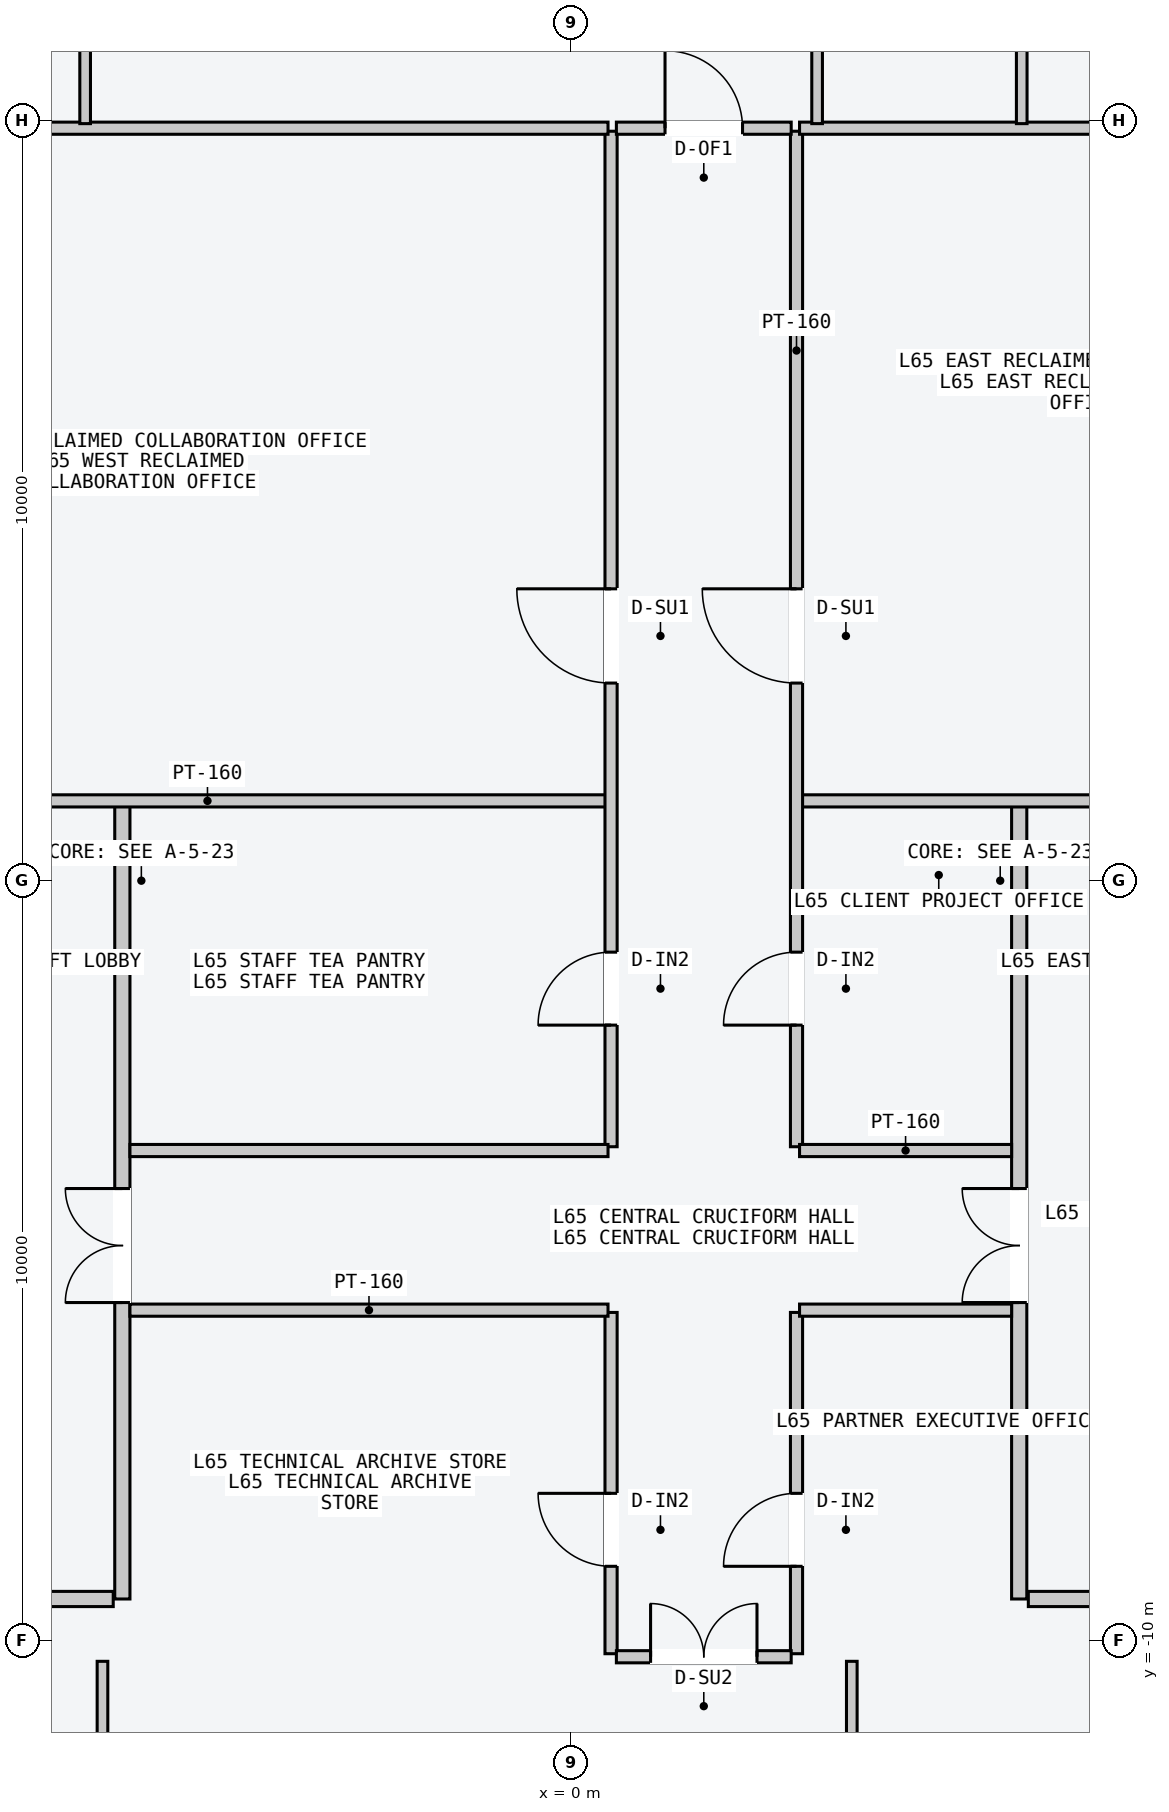
"""IFC4 building model, lengths in metres.
Left out: names, types, materials, properties, quantities, classifications, styles, units other than length and angle.
Written with IfcOpenShell. Run it as: python <this file> out.ifc"""

import sys

from ifc_helpers import new_model, si_unit, direction, frame, frame_2d, origin, place, context, subcontext, project, spatial, rectangle, extrude, element, fill, save


model = new_model("IFC4")
c1 = context("Model", 3, precision=1e-05, world=origin(), true_north=direction((0.0, 1.0)))
c2 = subcontext(c1, "Body", "Model", "MODEL_VIEW")
j1 = project(units=[si_unit("LENGTHUNIT", "METRE"), si_unit("PLANEANGLEUNIT", "RADIAN")], contexts=[c1])
p1 = place(None, origin())
s1 = spatial("IfcSite", under=j1, at=p1, CompositionType="ELEMENT")
p2 = place(p1, origin())
s2 = spatial("IfcBuilding", under=s1, at=p2, CompositionType="ELEMENT")
p3 = place(p2, frame((0.0, 0.0, 247.2)))
s3 = spatial("IfcBuildingStorey", under=s2, at=p3, CompositionType="ELEMENT", Elevation=247.2)
p4 = place(p3, frame((-5.9, -9.45, 0.0), z_axis=(0.0, 0.0, 1.0), x_axis=(0.0, 1.0, 0.0)))
e1 = element("IfcWall", 1, at=p4, inside=s3, PredefinedType="PARTITIONING", context=c2, shape_type="SweptSolid", body=[
    extrude(rectangle(XDim=10.5, YDim=0.2, at=frame_2d((5.25, 0.0))), origin(), (0.0, 0.0, 1.0), 3.4),
])
p5 = place(p4, frame((3.9, 0.0, 0.0)))
e2 = element("IfcOpeningElement", 2, at=p5, cuts=e1, PredefinedType="OPENING", context=c2, shape_type="SweptSolid", body=[
    extrude(rectangle(XDim=1.5, YDim=2.2, at=frame_2d((0.75, 1.1))), frame((0.0, 0.11, 0.0), z_axis=(0.0, -1.0, 0.0), x_axis=(1.0, 0.0, 0.0)), (0.0, 0.0, 1.0), 0.22),
])
p6 = place(p3, frame((-6.02, -9.45, 0.0), z_axis=(0.0, 0.0, 1.0), x_axis=(-1.0, 0.0, 0.0)))
e3 = element("IfcWall", 3, at=p6, inside=s3, PredefinedType="PARTITIONING", context=c2, shape_type="SweptSolid", body=[
    extrude(rectangle(XDim=1.8, YDim=0.2, at=frame_2d((0.9, 0.0))), origin(), (0.0, 0.0, 1.0), 3.4),
])
p7 = place(p3, frame((5.9, -9.45, 0.0), z_axis=(0.0, 0.0, 1.0), x_axis=(0.0, 1.0, 0.0)))
e4 = element("IfcWall", 4, at=p7, inside=s3, PredefinedType="PARTITIONING", context=c2, shape_type="SweptSolid", body=[
    extrude(rectangle(XDim=10.5, YDim=0.2, at=frame_2d((5.25, 0.0))), origin(), (0.0, 0.0, 1.0), 3.4),
])
p8 = place(p7, frame((3.9, 0.0, 0.0)))
e5 = element("IfcOpeningElement", 5, at=p8, cuts=e4, PredefinedType="OPENING", context=c2, shape_type="SweptSolid", body=[
    extrude(rectangle(XDim=1.5, YDim=2.2, at=frame_2d((0.75, 1.1))), frame((0.0, 0.11, 0.0), z_axis=(0.0, -1.0, 0.0), x_axis=(1.0, 0.0, 0.0)), (0.0, 0.0, 1.0), 0.22),
])
p9 = place(p3, frame((6.02, -9.45, 0.0), z_axis=(0.0, 0.0, 1.0), x_axis=(1.0, 0.0, 0.0)))
e6 = element("IfcWall", 6, at=p9, inside=s3, PredefinedType="PARTITIONING", context=c2, shape_type="SweptSolid", body=[
    extrude(rectangle(XDim=1.8, YDim=0.2, at=frame_2d((0.9, 0.0))), origin(), (0.0, 0.0, 1.0), 3.4),
])
p10 = place(p3, frame((-10.05, 1.05, 0.0), z_axis=(0.0, 0.0, 1.0), x_axis=(1.0, 0.0, 0.0)))
e7 = element("IfcWall", 7, at=p10, inside=s3, PredefinedType="PARTITIONING", context=c2, shape_type="SweptSolid", body=[
    extrude(rectangle(XDim=10.54, YDim=0.16, at=frame_2d((5.27, 0.0))), origin(), (0.0, 0.0, 1.0), 3.4),
])
p11 = place(p3, frame((0.53, -3.5, 0.0), z_axis=(0.0, 0.0, 1.0), x_axis=(0.0, 1.0, 0.0)))
e8 = element("IfcWall", 8, at=p11, inside=s3, PredefinedType="PARTITIONING", context=c2, shape_type="SweptSolid", body=[
    extrude(rectangle(XDim=13.36, YDim=0.16, at=frame_2d((6.68, 0.0))), origin(), (0.0, 0.0, 1.0), 3.4),
])
p12 = place(p11, frame((6.1, 0.0, 0.0)))
e9 = element("IfcOpeningElement", 9, at=p12, cuts=e8, PredefinedType="OPENING", context=c2, shape_type="SweptSolid", body=[
    extrude(rectangle(XDim=1.24, YDim=2.24, at=frame_2d((0.62, 1.12))), frame((0.0, 0.09, 0.0), z_axis=(0.0, -1.0, 0.0), x_axis=(1.0, 0.0, 0.0)), (0.0, 0.0, 1.0), 0.18),
])
p13 = place(p11, frame((1.6, 0.0, 0.0)))
e10 = element("IfcOpeningElement", 10, at=p13, cuts=e8, PredefinedType="OPENING", context=c2, shape_type="SweptSolid", body=[
    extrude(rectangle(XDim=0.96, YDim=2.18, at=frame_2d((0.48, 1.09))), frame((0.0, 0.09, 0.0), z_axis=(0.0, -1.0, 0.0), x_axis=(1.0, 0.0, 0.0)), (0.0, 0.0, 1.0), 0.18),
])
p14 = place(p3, frame((-7.5, 9.9, 0.0), z_axis=(0.0, 0.0, 1.0), x_axis=(1.0, 0.0, 0.0)))
e11 = element("IfcWall", 11, at=p14, inside=s3, PredefinedType="PARTITIONING", context=c2, shape_type="SweptSolid", body=[
    extrude(rectangle(XDim=7.99, YDim=0.16, at=frame_2d((3.995, 0.0))), origin(), (0.0, 0.0, 1.0), 3.4),
])
p15 = place(p3, frame((-5.8, -3.55, 0.0), z_axis=(0.0, 0.0, 1.0), x_axis=(1.0, 0.0, 0.0)))
e12 = element("IfcWall", 12, at=p15, inside=s3, PredefinedType="PARTITIONING", context=c2, shape_type="SweptSolid", body=[
    extrude(rectangle(XDim=6.29, YDim=0.16, at=frame_2d((3.145, 0.0))), origin(), (0.0, 0.0, 1.0), 3.4),
])
p16 = place(p3, frame((3.01, 1.05, 0.0), z_axis=(0.0, 0.0, 1.0), x_axis=(1.0, 0.0, 0.0)))
e13 = element("IfcWall", 13, at=p16, inside=s3, PredefinedType="PARTITIONING", context=c2, shape_type="SweptSolid", body=[
    extrude(rectangle(XDim=7.05, YDim=0.16, at=frame_2d((3.525, 0.0))), origin(), (0.0, 0.0, 1.0), 3.4),
])
p17 = place(p3, frame((2.97, -3.5, 0.0), z_axis=(0.0, 0.0, 1.0), x_axis=(0.0, 1.0, 0.0)))
e14 = element("IfcWall", 14, at=p17, inside=s3, PredefinedType="PARTITIONING", context=c2, shape_type="SweptSolid", body=[
    extrude(rectangle(XDim=13.36, YDim=0.16, at=frame_2d((6.68, 0.0))), origin(), (0.0, 0.0, 1.0), 3.4),
])
p18 = place(p17, frame((6.1, 0.0, 0.0)))
e15 = element("IfcOpeningElement", 15, at=p18, cuts=e14, PredefinedType="OPENING", context=c2, shape_type="SweptSolid", body=[
    extrude(rectangle(XDim=1.24, YDim=2.24, at=frame_2d((0.62, 1.12))), frame((0.0, 0.09, 0.0), z_axis=(0.0, -1.0, 0.0), x_axis=(1.0, 0.0, 0.0)), (0.0, 0.0, 1.0), 0.18),
])
p19 = place(p17, frame((1.6, 0.0, 0.0)))
e16 = element("IfcOpeningElement", 16, at=p19, cuts=e14, PredefinedType="OPENING", context=c2, shape_type="SweptSolid", body=[
    extrude(rectangle(XDim=0.96, YDim=2.18, at=frame_2d((0.48, 1.09))), frame((0.0, 0.09, 0.0), z_axis=(0.0, -1.0, 0.0), x_axis=(1.0, 0.0, 0.0)), (0.0, 0.0, 1.0), 0.18),
])
p20 = place(p3, frame((3.01, 9.9, 0.0), z_axis=(0.0, 0.0, 1.0), x_axis=(1.0, 0.0, 0.0)))
e17 = element("IfcWall", 17, at=p20, inside=s3, PredefinedType="PARTITIONING", context=c2, shape_type="SweptSolid", body=[
    extrude(rectangle(XDim=4.49, YDim=0.16, at=frame_2d((2.245, 0.0))), origin(), (0.0, 0.0, 1.0), 3.4),
])
p21 = place(p3, frame((3.01, -3.55, 0.0), z_axis=(0.0, 0.0, 1.0), x_axis=(1.0, 0.0, 0.0)))
e18 = element("IfcWall", 18, at=p21, inside=s3, PredefinedType="PARTITIONING", context=c2, shape_type="SweptSolid", body=[
    extrude(rectangle(XDim=2.79, YDim=0.16, at=frame_2d((1.395, 0.0))), origin(), (0.0, 0.0, 1.0), 3.4),
])
p22 = place(p3, frame((0.53, -10.17, 0.0), z_axis=(0.0, 0.0, 1.0), x_axis=(0.0, 1.0, 0.0)))
e19 = element("IfcWall", 19, at=p22, inside=s3, PredefinedType="PARTITIONING", context=c2, shape_type="SweptSolid", body=[
    extrude(rectangle(XDim=4.49, YDim=0.16, at=frame_2d((2.245, 0.0))), origin(), (0.0, 0.0, 1.0), 3.4),
])
p23 = place(p22, frame((1.15, 0.0, 0.0)))
e20 = element("IfcOpeningElement", 20, at=p23, cuts=e19, PredefinedType="OPENING", context=c2, shape_type="SweptSolid", body=[
    extrude(rectangle(XDim=0.96, YDim=2.18, at=frame_2d((0.48, 1.09))), frame((0.0, 0.09, 0.0), z_axis=(0.0, -1.0, 0.0), x_axis=(1.0, 0.0, 0.0)), (0.0, 0.0, 1.0), 0.18),
])
p24 = place(p3, frame((2.97, -10.17, 0.0), z_axis=(0.0, 0.0, 1.0), x_axis=(0.0, 1.0, 0.0)))
e21 = element("IfcWall", 21, at=p24, inside=s3, PredefinedType="PARTITIONING", context=c2, shape_type="SweptSolid", body=[
    extrude(rectangle(XDim=4.49, YDim=0.16, at=frame_2d((2.245, 0.0))), origin(), (0.0, 0.0, 1.0), 3.4),
])
p25 = place(p24, frame((1.15, 0.0, 0.0)))
e22 = element("IfcOpeningElement", 22, at=p25, cuts=e21, PredefinedType="OPENING", context=c2, shape_type="SweptSolid", body=[
    extrude(rectangle(XDim=0.96, YDim=2.18, at=frame_2d((0.48, 1.09))), frame((0.0, 0.09, 0.0), z_axis=(0.0, -1.0, 0.0), x_axis=(1.0, 0.0, 0.0)), (0.0, 0.0, 1.0), 0.18),
])
p26 = place(p3, frame((-5.8, -5.65, 0.0), z_axis=(0.0, 0.0, 1.0), x_axis=(1.0, 0.0, 0.0)))
e23 = element("IfcWall", 23, at=p26, inside=s3, PredefinedType="PARTITIONING", context=c2, shape_type="SweptSolid", body=[
    extrude(rectangle(XDim=6.29, YDim=0.16, at=frame_2d((3.145, 0.0))), origin(), (0.0, 0.0, 1.0), 3.4),
])
p27 = place(p3, frame((3.01, -5.65, 0.0), z_axis=(0.0, 0.0, 1.0), x_axis=(1.0, 0.0, 0.0)))
e24 = element("IfcWall", 24, at=p27, inside=s3, PredefinedType="PARTITIONING", context=c2, shape_type="SweptSolid", body=[
    extrude(rectangle(XDim=2.79, YDim=0.16, at=frame_2d((1.395, 0.0))), origin(), (0.0, 0.0, 1.0), 3.4),
])
p28 = place(p3, frame((-6.39, 9.96, 0.0), z_axis=(0.0, 0.0, 1.0), x_axis=(0.0, 1.0, 0.0)))
e25 = element("IfcWall", 25, at=p28, inside=s3, PredefinedType="PARTITIONING", context=c2, shape_type="SweptSolid", body=[
    extrude(rectangle(XDim=7.6, YDim=0.14, at=frame_2d((3.8, 0.0))), origin(), (0.0, 0.0, 1.0), 3.4),
])
p29 = place(p28, frame((1.15, 0.0, 0.0)))
e26 = element("IfcOpeningElement", 26, at=p29, cuts=e25, PredefinedType="OPENING", context=c2, shape_type="SweptSolid", body=[
    extrude(rectangle(XDim=0.96, YDim=2.18, at=frame_2d((0.48, 1.09))), frame((0.0, 0.08, 0.0), z_axis=(0.0, -1.0, 0.0), x_axis=(1.0, 0.0, 0.0)), (0.0, 0.0, 1.0), 0.16),
])
p30 = place(p3, frame((3.241, 9.96, 0.0), z_axis=(0.0, 0.0, 1.0), x_axis=(0.0, 1.0, 0.0)))
e27 = element("IfcWall", 27, at=p30, inside=s3, PredefinedType="PARTITIONING", context=c2, shape_type="SweptSolid", body=[
    extrude(rectangle(XDim=7.6, YDim=0.14, at=frame_2d((3.8, 0.0))), origin(), (0.0, 0.0, 1.0), 3.4),
])
p31 = place(p30, frame((1.15, 0.0, 0.0)))
e28 = element("IfcOpeningElement", 28, at=p31, cuts=e27, PredefinedType="OPENING", context=c2, shape_type="SweptSolid", body=[
    extrude(rectangle(XDim=0.96, YDim=2.18, at=frame_2d((0.48, 1.09))), frame((0.0, 0.08, 0.0), z_axis=(0.0, -1.0, 0.0), x_axis=(1.0, 0.0, 0.0)), (0.0, 0.0, 1.0), 0.16),
])
p32 = place(p3, frame((5.933, 9.96, 0.0), z_axis=(0.0, 0.0, 1.0), x_axis=(0.0, 1.0, 0.0)))
e29 = element("IfcWall", 29, at=p32, inside=s3, PredefinedType="PARTITIONING", context=c2, shape_type="SweptSolid", body=[
    extrude(rectangle(XDim=7.6, YDim=0.14, at=frame_2d((3.8, 0.0))), origin(), (0.0, 0.0, 1.0), 3.4),
])
p33 = place(p32, frame((1.15, 0.0, 0.0)))
e30 = element("IfcOpeningElement", 30, at=p33, cuts=e29, PredefinedType="OPENING", context=c2, shape_type="SweptSolid", body=[
    extrude(rectangle(XDim=0.96, YDim=2.18, at=frame_2d((0.48, 1.09))), frame((0.0, 0.08, 0.0), z_axis=(0.0, -1.0, 0.0), x_axis=(1.0, 0.0, 0.0)), (0.0, 0.0, 1.0), 0.16),
])
p34 = place(p3, frame((0.6, 9.9, 0.0), z_axis=(0.0, 0.0, 1.0), x_axis=(1.0, 0.0, 0.0)))
e31 = element("IfcWall", 31, at=p34, inside=s3, PredefinedType="PARTITIONING", context=c2, shape_type="SweptSolid", body=[
    extrude(rectangle(XDim=2.3, YDim=0.16, at=frame_2d((1.15, 0.0))), origin(), (0.0, 0.0, 1.0), 3.4),
])
p35 = place(p34, frame((0.64, 0.0, 0.0)))
e32 = element("IfcOpeningElement", 32, at=p35, cuts=e31, PredefinedType="OPENING", context=c2, shape_type="SweptSolid", body=[
    extrude(rectangle(XDim=1.02, YDim=2.2, at=frame_2d((0.51, 1.1))), frame((0.0, 0.09, 0.0), z_axis=(0.0, -1.0, 0.0), x_axis=(1.0, 0.0, 0.0)), (0.0, 0.0, 1.0), 0.18),
])
p36 = place(p3, frame((-6.161, -16.55, 0.0), z_axis=(0.0, 0.0, 1.0), x_axis=(0.0, 1.0, 0.0)))
e33 = element("IfcWall", 33, at=p36, inside=s3, PredefinedType="PARTITIONING", context=c2, shape_type="SweptSolid", body=[
    extrude(rectangle(XDim=6.28, YDim=0.14, at=frame_2d((3.14, 0.0))), origin(), (0.0, 0.0, 1.0), 3.4),
])
p37 = place(p36, frame((1.05, 0.0, 0.0)))
e34 = element("IfcOpeningElement", 34, at=p37, cuts=e33, PredefinedType="OPENING", context=c2, shape_type="SweptSolid", body=[
    extrude(rectangle(XDim=0.96, YDim=2.18, at=frame_2d((0.48, 1.09))), frame((0.0, 0.08, 0.0), z_axis=(0.0, -1.0, 0.0), x_axis=(1.0, 0.0, 0.0)), (0.0, 0.0, 1.0), 0.16),
])
p38 = place(p3, frame((3.698, -17.56, 0.0), z_axis=(0.0, 0.0, 1.0), x_axis=(0.0, 1.0, 0.0)))
e35 = element("IfcWall", 35, at=p38, inside=s3, PredefinedType="PARTITIONING", context=c2, shape_type="SweptSolid", body=[
    extrude(rectangle(XDim=7.29, YDim=0.14, at=frame_2d((3.645, 0.0))), origin(), (0.0, 0.0, 1.0), 3.4),
])
p39 = place(p38, frame((1.05, 0.0, 0.0)))
e36 = element("IfcOpeningElement", 36, at=p39, cuts=e35, PredefinedType="OPENING", context=c2, shape_type="SweptSolid", body=[
    extrude(rectangle(XDim=0.96, YDim=2.18, at=frame_2d((0.48, 1.09))), frame((0.0, 0.08, 0.0), z_axis=(0.0, -1.0, 0.0), x_axis=(1.0, 0.0, 0.0)), (0.0, 0.0, 1.0), 0.16),
])
p40 = place(p3, frame((0.6, -10.21, 0.0), z_axis=(0.0, 0.0, 1.0), x_axis=(1.0, 0.0, 0.0)))
e37 = element("IfcWall", 37, at=p40, inside=s3, PredefinedType="PARTITIONING", context=c2, shape_type="SweptSolid", body=[
    extrude(rectangle(XDim=2.3, YDim=0.16, at=frame_2d((1.15, 0.0))), origin(), (0.0, 0.0, 1.0), 3.4),
])
p41 = place(p40, frame((0.45, 0.0, 0.0)))
e38 = element("IfcOpeningElement", 38, at=p41, cuts=e37, PredefinedType="OPENING", context=c2, shape_type="SweptSolid", body=[
    extrude(rectangle(XDim=1.4, YDim=2.2, at=frame_2d((0.7, 1.1))), frame((0.0, 0.09, 0.0), z_axis=(0.0, -1.0, 0.0), x_axis=(1.0, 0.0, 0.0)), (0.0, 0.0, 1.0), 0.18),
])
p42 = place(p5, origin())
e39 = element("IfcDoor", 39, at=p42, inside=s3, OperationType="DOUBLE_DOOR_SINGLE_SWING", PredefinedType="DOOR", context=c2, shape_type="SweptSolid", body=[
    extrude(rectangle(XDim=1.5, YDim=2.2, at=frame_2d((0.75, 1.1))), frame((0.0, 0.025, 0.0), z_axis=(0.0, -1.0, 0.0), x_axis=(1.0, 0.0, 0.0)), (0.0, 0.0, 1.0), 0.05),
])
fill(e2, e39)
p43 = place(p8, origin())
e40 = element("IfcDoor", 40, at=p43, inside=s3, OperationType="DOUBLE_DOOR_SINGLE_SWING", PredefinedType="DOOR", context=c2, shape_type="SweptSolid", body=[
    extrude(rectangle(XDim=1.5, YDim=2.2, at=frame_2d((0.75, 1.1))), frame((0.0, 0.025, 0.0), z_axis=(0.0, -1.0, 0.0), x_axis=(1.0, 0.0, 0.0)), (0.0, 0.0, 1.0), 0.05),
])
fill(e5, e40)
p44 = place(p12, origin())
e41 = element("IfcDoor", 41, at=p44, inside=s3, OperationType="SINGLE_SWING_RIGHT", PredefinedType="DOOR", context=c2, shape_type="SweptSolid", body=[
    extrude(rectangle(XDim=1.24, YDim=2.24, at=frame_2d((0.62, 1.12))), frame((0.0, 0.025, 0.0), z_axis=(0.0, -1.0, 0.0), x_axis=(1.0, 0.0, 0.0)), (0.0, 0.0, 1.0), 0.05),
])
fill(e9, e41)
p45 = place(p13, origin())
e42 = element("IfcDoor", 42, at=p45, inside=s3, OperationType="SINGLE_SWING_LEFT", PredefinedType="DOOR", context=c2, shape_type="SweptSolid", body=[
    extrude(rectangle(XDim=0.96, YDim=2.18, at=frame_2d((0.48, 1.09))), frame((0.0, 0.025, 0.0), z_axis=(0.0, -1.0, 0.0), x_axis=(1.0, 0.0, 0.0)), (0.0, 0.0, 1.0), 0.05),
])
fill(e10, e42)
p46 = place(p18, origin())
e43 = element("IfcDoor", 43, at=p46, inside=s3, OperationType="SINGLE_SWING_RIGHT", PredefinedType="DOOR", context=c2, shape_type="SweptSolid", body=[
    extrude(rectangle(XDim=1.24, YDim=2.24, at=frame_2d((0.62, 1.12))), frame((0.0, 0.025, 0.0), z_axis=(0.0, -1.0, 0.0), x_axis=(1.0, 0.0, 0.0)), (0.0, 0.0, 1.0), 0.05),
])
fill(e15, e43)
p47 = place(p19, origin())
e44 = element("IfcDoor", 44, at=p47, inside=s3, OperationType="SINGLE_SWING_LEFT", PredefinedType="DOOR", context=c2, shape_type="SweptSolid", body=[
    extrude(rectangle(XDim=0.96, YDim=2.18, at=frame_2d((0.48, 1.09))), frame((0.0, 0.025, 0.0), z_axis=(0.0, -1.0, 0.0), x_axis=(1.0, 0.0, 0.0)), (0.0, 0.0, 1.0), 0.05),
])
fill(e16, e44)
p48 = place(p23, origin())
e45 = element("IfcDoor", 45, at=p48, inside=s3, OperationType="SINGLE_SWING_RIGHT", PredefinedType="DOOR", context=c2, shape_type="SweptSolid", body=[
    extrude(rectangle(XDim=0.96, YDim=2.18, at=frame_2d((0.48, 1.09))), frame((0.0, 0.025, 0.0), z_axis=(0.0, -1.0, 0.0), x_axis=(1.0, 0.0, 0.0)), (0.0, 0.0, 1.0), 0.05),
])
fill(e20, e45)
p49 = place(p25, origin())
e46 = element("IfcDoor", 46, at=p49, inside=s3, OperationType="SINGLE_SWING_LEFT", PredefinedType="DOOR", context=c2, shape_type="SweptSolid", body=[
    extrude(rectangle(XDim=0.96, YDim=2.18, at=frame_2d((0.48, 1.09))), frame((0.0, 0.025, 0.0), z_axis=(0.0, -1.0, 0.0), x_axis=(1.0, 0.0, 0.0)), (0.0, 0.0, 1.0), 0.05),
])
fill(e22, e46)
p50 = place(p35, origin())
e47 = element("IfcDoor", 47, at=p50, inside=s3, OperationType="SINGLE_SWING_LEFT", PredefinedType="DOOR", context=c2, shape_type="SweptSolid", body=[
    extrude(rectangle(XDim=1.02, YDim=2.2, at=frame_2d((0.51, 1.1))), frame((0.0, 0.025, 0.0), z_axis=(0.0, -1.0, 0.0), x_axis=(1.0, 0.0, 0.0)), (0.0, 0.0, 1.0), 0.05),
])
fill(e32, e47)
p51 = place(p41, origin())
e48 = element("IfcDoor", 48, at=p51, inside=s3, OperationType="DOUBLE_DOOR_SINGLE_SWING", PredefinedType="DOOR", context=c2, shape_type="SweptSolid", body=[
    extrude(rectangle(XDim=1.4, YDim=2.2, at=frame_2d((0.7, 1.1))), frame((0.0, 0.025, 0.0), z_axis=(0.0, -1.0, 0.0), x_axis=(1.0, 0.0, 0.0)), (0.0, 0.0, 1.0), 0.05),
])
fill(e38, e48)
save(model, sys.argv[1])
